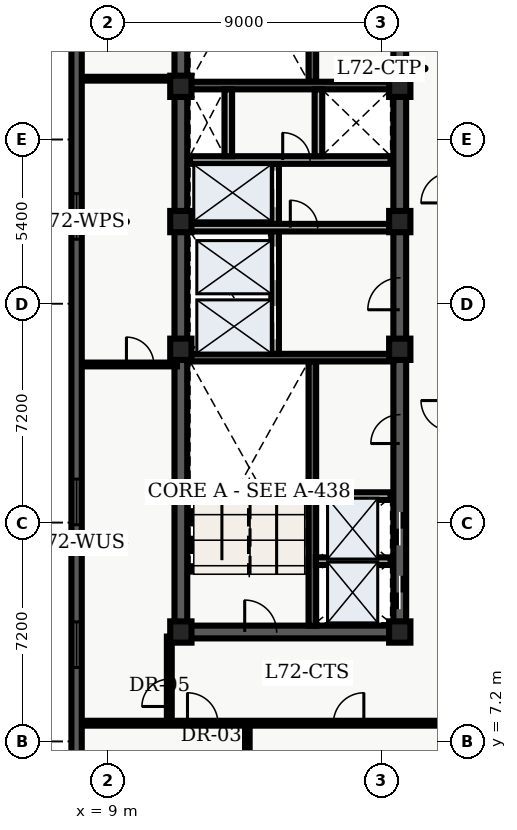
"""IFC4 building model, lengths in metres.
Left out: names, types, materials, properties, quantities, classifications, styles, units other than length and angle.
Written with IfcOpenShell. Run it as: python <this file> out.ifc"""

import sys

from ifc_helpers import new_model, entity, si_unit, converted_unit, direction, frame, origin_with_axes, origin_2d_with_axis, place, context, subcontext, project, spatial, polyline, rectangle, outline, extrude, element, fill, save


model = new_model("IFC4")
c1 = context("Model", 3, precision=1e-05, world=origin_with_axes(), true_north=direction((0.0, 1.0)))
c2 = subcontext(c1, "Body", "Model", "MODEL_VIEW")
j1 = project(units=[si_unit("LENGTHUNIT", "METRE"), converted_unit("PLANEANGLEUNIT", "DEGREE", entity("IfcPlaneAngleMeasure", 0.017), si_unit("PLANEANGLEUNIT", "RADIAN"), dimensions=[0, 0, 0, 0, 0, 0, 0])], contexts=[c1])
p1 = place(None, origin_with_axes())
s1 = spatial("IfcSite", under=j1, at=p1, CompositionType="ELEMENT")
p2 = place(p1, origin_with_axes())
s2 = spatial("IfcBuilding", under=s1, at=p2, CompositionType="ELEMENT")
p3 = place(p2, frame((0.0, 0.0, 291.9), z_axis=(0.0, 0.0, 1.0), x_axis=(1.0, 0.0, 0.0)))
s3 = spatial("IfcBuildingStorey", under=s2, at=p3, CompositionType="ELEMENT", Elevation=291.9)
p4 = place(p3, frame((11.4, 10.8, 0.0), z_axis=(0.0, 0.0, 1.0), x_axis=(0.0, 1.0, 0.0)))
e1 = element("IfcWall", 1, at=p4, inside=s3, PredefinedType="SHEAR", context=c2, shape_type="SweptSolid", body=[
    extrude(outline(polyline([(0.0, -0.21), (27.0, -0.21), (27.0, 0.21), (0.0, 0.21), (0.0, -0.21)])), origin_with_axes(), (0.0, 0.0, 1.0), 3.66),
])
p5 = place(p3, frame((11.4, 10.8, 0.0), z_axis=(0.0, 0.0, 1.0), x_axis=(1.0, 0.0, 0.0)))
e2 = element("IfcWall", 2, at=p5, inside=s3, PredefinedType="SHEAR", context=c2, shape_type="SweptSolid", body=[
    extrude(outline(polyline([(0.0, -0.21), (7.2, -0.21), (7.2, 0.21), (0.0, 0.21), (0.0, -0.21)])), origin_with_axes(), (0.0, 0.0, 1.0), 3.66),
])
p6 = place(p5, frame((2.625, 0.0, 0.0), z_axis=(0.0, 0.0, 1.0), x_axis=(1.0, 0.0, 0.0)))
e3 = element("IfcOpeningElement", 3, at=p6, cuts=e2, PredefinedType="OPENING", context=c2, shape_type="SweptSolid", body=[
    extrude(rectangle(XDim=1.05, YDim=0.44, at=origin_2d_with_axis()), origin_with_axes(), (0.0, 0.0, 1.0), 2.15),
])
p7 = place(p3, frame((18.6, 10.8, 0.0), z_axis=(0.0, 0.0, 1.0), x_axis=(0.0, 1.0, 0.0)))
e4 = element("IfcWall", 4, at=p7, inside=s3, PredefinedType="SHEAR", context=c2, shape_type="SweptSolid", body=[
    extrude(outline(polyline([(0.0, -0.21), (13.5, -0.21), (13.5, 0.21), (0.0, 0.21), (0.0, -0.21)])), origin_with_axes(), (0.0, 0.0, 1.0), 3.66),
])
p8 = place(p7, frame((1.3, 0.0, 0.0), z_axis=(0.0, 0.0, 1.0), x_axis=(1.0, 0.0, 0.0)))
e5 = element("IfcOpeningElement", 5, at=p8, cuts=e4, PredefinedType="OPENING", context=c2, shape_type="SweptSolid", body=[
    extrude(rectangle(XDim=1.1, YDim=0.44, at=origin_2d_with_axis()), origin_with_axes(), (0.0, 0.0, 1.0), 2.15),
])
p9 = place(p7, frame((3.4, 0.0, 0.0), z_axis=(0.0, 0.0, 1.0), x_axis=(1.0, 0.0, 0.0)))
e6 = element("IfcOpeningElement", 6, at=p9, cuts=e4, PredefinedType="OPENING", context=c2, shape_type="SweptSolid", body=[
    extrude(rectangle(XDim=1.1, YDim=0.44, at=origin_2d_with_axis()), origin_with_axes(), (0.0, 0.0, 1.0), 2.15),
])
p10 = place(p7, frame((11.125, 0.0, 0.0), z_axis=(0.0, 0.0, 1.0), x_axis=(1.0, 0.0, 0.0)))
e7 = element("IfcOpeningElement", 7, at=p10, cuts=e4, PredefinedType="OPENING", context=c2, shape_type="SweptSolid", body=[
    extrude(rectangle(XDim=1.05, YDim=0.44, at=origin_2d_with_axis()), origin_with_axes(), (0.0, 0.0, 1.0), 2.15),
])
p11 = place(p7, frame((6.675, 0.0, 0.0), z_axis=(0.0, 0.0, 1.0), x_axis=(1.0, 0.0, 0.0)))
e8 = element("IfcOpeningElement", 8, at=p11, cuts=e4, PredefinedType="OPENING", context=c2, shape_type="SweptSolid", body=[
    extrude(rectangle(XDim=0.95, YDim=0.44, at=origin_2d_with_axis()), origin_with_axes(), (0.0, 0.0, 1.0), 2.15),
])
p12 = place(p3, frame((18.6, 24.3, 0.0), z_axis=(0.0, 0.0, 1.0), x_axis=(0.0, 1.0, 0.0)))
e9 = element("IfcWall", 9, at=p12, inside=s3, PredefinedType="SHEAR", context=c2, shape_type="SweptSolid", body=[
    extrude(outline(polyline([(0.0, -0.21), (13.5, -0.21), (13.5, 0.21), (0.0, 0.21), (0.0, -0.21)])), origin_with_axes(), (0.0, 0.0, 1.0), 3.66),
])
p13 = place(p12, frame((8.525, 0.0, 0.0), z_axis=(0.0, 0.0, 1.0), x_axis=(1.0, 0.0, 0.0)))
e10 = element("IfcOpeningElement", 10, at=p13, cuts=e9, PredefinedType="OPENING", context=c2, shape_type="SweptSolid", body=[
    extrude(rectangle(XDim=1.05, YDim=0.44, at=origin_2d_with_axis()), origin_with_axes(), (0.0, 0.0, 1.0), 2.15),
])
p14 = place(p3, frame((15.725, 11.01, 0.0), z_axis=(0.0, 0.0, 1.0), x_axis=(0.0, 1.0, 0.0)))
e11 = element("IfcWall", 11, at=p14, inside=s3, PredefinedType="SHEAR", context=c2, shape_type="SweptSolid", body=[
    extrude(outline(polyline([(0.0, -0.125), (8.69, -0.125), (8.69, 0.125), (0.0, 0.125), (0.0, -0.125)])), origin_with_axes(), (0.0, 0.0, 1.0), 3.66),
])
p15 = place(p3, frame((11.61, 19.825, 0.0), z_axis=(0.0, 0.0, 1.0), x_axis=(1.0, 0.0, 0.0)))
e12 = element("IfcWall", 12, at=p15, inside=s3, PredefinedType="SHEAR", context=c2, shape_type="SweptSolid", body=[
    extrude(outline(polyline([(0.0, -0.125), (6.78, -0.125), (6.78, 0.125), (0.0, 0.125), (0.0, -0.125)])), origin_with_axes(), (0.0, 0.0, 1.0), 3.66),
])
p16 = place(p3, frame((15.725, 28.9, 0.0), z_axis=(0.0, 0.0, 1.0), x_axis=(0.0, 1.0, 0.0)))
e13 = element("IfcWall", 13, at=p16, inside=s3, PredefinedType="SHEAR", context=c2, shape_type="SweptSolid", body=[
    extrude(outline(polyline([(0.0, -0.125), (8.69, -0.125), (8.69, 0.125), (0.0, 0.125), (0.0, -0.125)])), origin_with_axes(), (0.0, 0.0, 1.0), 3.66),
])
p17 = place(p3, frame((11.61, 28.775, 0.0), z_axis=(0.0, 0.0, 1.0), x_axis=(1.0, 0.0, 0.0)))
e14 = element("IfcWall", 14, at=p17, inside=s3, PredefinedType="SHEAR", context=c2, shape_type="SweptSolid", body=[
    extrude(outline(polyline([(0.0, -0.125), (6.78, -0.125), (6.78, 0.125), (0.0, 0.125), (0.0, -0.125)])), origin_with_axes(), (0.0, 0.0, 1.0), 3.66),
])
p18 = place(p3, frame((14.5, 19.95, 0.0), z_axis=(0.0, 0.0, 1.0), x_axis=(0.0, 1.0, 0.0)))
e15 = element("IfcWall", 15, at=p18, inside=s3, PredefinedType="SOLIDWALL", context=c2, shape_type="SweptSolid", body=[
    extrude(outline(polyline([(0.0, -0.125), (6.25, -0.125), (6.25, 0.125), (0.0, 0.125), (0.0, -0.125)])), origin_with_axes(), (0.0, 0.0, 1.0), 2.7),
])
p19 = place(p18, frame((1.025, 0.0, 0.0), z_axis=(0.0, 0.0, 1.0), x_axis=(1.0, 0.0, 0.0)))
e16 = element("IfcOpeningElement", 16, at=p19, cuts=e15, PredefinedType="OPENING", context=c2, shape_type="SweptSolid", body=[
    extrude(rectangle(XDim=1.1, YDim=0.27, at=origin_2d_with_axis()), origin_with_axes(), (0.0, 0.0, 1.0), 2.15),
])
p20 = place(p18, frame((2.975, 0.0, 0.0), z_axis=(0.0, 0.0, 1.0), x_axis=(1.0, 0.0, 0.0)))
e17 = element("IfcOpeningElement", 17, at=p20, cuts=e15, PredefinedType="OPENING", context=c2, shape_type="SweptSolid", body=[
    extrude(rectangle(XDim=1.1, YDim=0.27, at=origin_2d_with_axis()), origin_with_axes(), (0.0, 0.0, 1.0), 2.15),
])
p21 = place(p18, frame((5.425, 0.0, 0.0), z_axis=(0.0, 0.0, 1.0), x_axis=(1.0, 0.0, 0.0)))
e18 = element("IfcOpeningElement", 18, at=p21, cuts=e15, PredefinedType="OPENING", context=c2, shape_type="SweptSolid", body=[
    extrude(rectangle(XDim=1.2, YDim=0.27, at=origin_2d_with_axis()), origin_with_axes(), (0.0, 0.0, 1.0), 2.15),
])
p22 = place(p3, frame((11.7, 24.1, 0.0), z_axis=(0.0, 0.0, 1.0), x_axis=(1.0, 0.0, 0.0)))
e19 = element("IfcWall", 19, at=p22, inside=s3, PredefinedType="SOLIDWALL", context=c2, shape_type="SweptSolid", body=[
    extrude(outline(polyline([(0.0, -0.125), (6.6, -0.125), (6.6, 0.125), (0.0, 0.125), (0.0, -0.125)])), origin_with_axes(), (0.0, 0.0, 1.0), 2.7),
])
p23 = place(p22, frame((3.75, 0.0, 0.0), z_axis=(0.0, 0.0, 1.0), x_axis=(1.0, 0.0, 0.0)))
e20 = element("IfcOpeningElement", 20, at=p23, cuts=e19, PredefinedType="OPENING", context=c2, shape_type="SweptSolid", body=[
    extrude(rectangle(XDim=0.9, YDim=0.27, at=origin_2d_with_axis()), origin_with_axes(), (0.0, 0.0, 1.0), 2.15),
])
p24 = place(p3, frame((11.7, 26.325, 0.0), z_axis=(0.0, 0.0, 1.0), x_axis=(1.0, 0.0, 0.0)))
e21 = element("IfcWall", 21, at=p24, inside=s3, PredefinedType="SOLIDWALL", context=c2, shape_type="SweptSolid", body=[
    extrude(outline(polyline([(0.0, -0.125), (6.6, -0.125), (6.6, 0.125), (0.0, 0.125), (0.0, -0.125)])), origin_with_axes(), (0.0, 0.0, 1.0), 2.7),
])
p25 = place(p24, frame((3.5, 0.0, 0.0), z_axis=(0.0, 0.0, 1.0), x_axis=(1.0, 0.0, 0.0)))
e22 = element("IfcOpeningElement", 22, at=p25, cuts=e21, PredefinedType="OPENING", context=c2, shape_type="SweptSolid", body=[
    extrude(rectangle(XDim=0.9, YDim=0.27, at=origin_2d_with_axis()), origin_with_axes(), (0.0, 0.0, 1.0), 2.15),
])
for number, where, z_axis, x_axis in (
    (23, (12.96, 26.45, 0.0), (0.0, 0.0, 1.0), (0.0, 1.0, 0.0)),
    (24, (15.925, 26.45, 0.0), (0.0, 0.0, 1.0), (0.0, 1.0, 0.0)),
):
    element("IfcWall", number, at=place(p3, frame(where, z_axis=z_axis, x_axis=x_axis)), inside=s3, PredefinedType="SOLIDWALL", context=c2, shape_type="SweptSolid", body=[
        extrude(outline(polyline([(0.0, -0.125), (2.2, -0.125), (2.2, 0.125), (0.0, 0.125), (0.0, -0.125)])), origin_with_axes(), (0.0, 0.0, 1.0), 2.7),
    ])
for number, where, z_axis, x_axis in (
    (25, (11.4, 10.8, 0.0), (0.0, 0.0, 1.0), (1.0, 0.0, 0.0)),
    (26, (11.4, 20.1, 0.0), (0.0, 0.0, 1.0), (1.0, 0.0, 0.0)),
    (27, (11.4, 24.3, 0.0), (0.0, 0.0, 1.0), (1.0, 0.0, 0.0)),
    (28, (11.4, 28.75, 0.0), (0.0, 0.0, 1.0), (1.0, 0.0, 0.0)),
    (29, (18.6, 10.8, 0.0), (0.0, 0.0, 1.0), (1.0, 0.0, 0.0)),
    (30, (18.6, 20.1, 0.0), (0.0, 0.0, 1.0), (1.0, 0.0, 0.0)),
    (31, (18.6, 24.3, 0.0), (0.0, 0.0, 1.0), (1.0, 0.0, 0.0)),
    (32, (18.6, 28.75, 0.0), (0.0, 0.0, 1.0), (1.0, 0.0, 0.0)),
):
    element("IfcColumn", number, at=place(p3, frame(where, z_axis=z_axis, x_axis=x_axis)), inside=s3, PredefinedType="COLUMN", context=c2, shape_type="SweptSolid", body=[
        extrude(rectangle(XDim=0.7, YDim=0.7, at=origin_2d_with_axis()), origin_with_axes(), (0.0, 0.0, 1.0), 3.9),
    ])
for number, where, z_axis, x_axis in (
    (33, (15.84, 13.13, 0.0), (0.0, 0.0, 1.0), (1.0, 0.0, 0.0)),
    (34, (15.84, 15.27, 0.0), (0.0, 0.0, 1.0), (1.0, 0.0, 0.0)),
):
    element("IfcWall", number, at=place(p3, frame(where, z_axis=z_axis, x_axis=x_axis)), inside=s3, PredefinedType="SOLIDWALL", context=c2, shape_type="SweptSolid", body=[
        extrude(outline(polyline([(0.0, -0.125), (2.46, -0.125), (2.46, 0.125), (0.0, 0.125), (0.0, -0.125)])), origin_with_axes(), (0.0, 0.0, 1.0), 2.7),
    ])
p26 = place(p3, frame((8.135, 7.8, 0.0), z_axis=(0.0, 0.0, 1.0), x_axis=(1.0, 0.0, 0.0)))
e35 = element("IfcWall", 35, at=p26, inside=s3, PredefinedType="PARTITIONING", context=c2, shape_type="SweptSolid", body=[
    extrude(outline(polyline([(0.0, -0.08), (12.165, -0.08), (12.165, 0.08), (0.0, 0.08), (0.0, -0.08)])), origin_with_axes(), (0.0, 0.0, 1.0), 2.7),
])
p27 = place(p26, frame((3.983, 0.0, 0.0), z_axis=(0.0, 0.0, 1.0), x_axis=(1.0, 0.0, 0.0)))
e36 = element("IfcOpeningElement", 36, at=p27, cuts=e35, PredefinedType="OPENING", context=c2, shape_type="SweptSolid", body=[
    extrude(rectangle(XDim=1.0, YDim=0.18, at=origin_2d_with_axis()), origin_with_axes(), (0.0, 0.0, 1.0), 2.15),
])
p28 = place(p26, frame((8.784, 0.0, 0.0), z_axis=(0.0, 0.0, 1.0), x_axis=(1.0, 0.0, 0.0)))
e37 = element("IfcOpeningElement", 37, at=p28, cuts=e35, PredefinedType="OPENING", context=c2, shape_type="SweptSolid", body=[
    extrude(rectangle(XDim=1.0, YDim=0.18, at=origin_2d_with_axis()), origin_with_axes(), (0.0, 0.0, 1.0), 2.15),
])
p29 = place(p3, frame((11.02, 7.8, 0.0), z_axis=(0.0, 0.0, 1.0), x_axis=(0.0, 1.0, 0.0)))
e38 = element("IfcWall", 38, at=p29, inside=s3, PredefinedType="PARTITIONING", context=c2, shape_type="SweptSolid", body=[
    extrude(outline(polyline([(0.0, -0.08), (2.85, -0.08), (2.85, 0.08), (0.0, 0.08), (0.0, -0.08)])), origin_with_axes(), (0.0, 0.0, 1.0), 2.7),
])
p30 = place(p29, frame((1.0, 0.0, 0.0), z_axis=(0.0, 0.0, 1.0), x_axis=(1.0, 0.0, 0.0)))
e39 = element("IfcOpeningElement", 39, at=p30, cuts=e38, PredefinedType="OPENING", context=c2, shape_type="SweptSolid", body=[
    extrude(rectangle(XDim=0.9, YDim=0.18, at=origin_2d_with_axis()), origin_with_axes(), (0.0, 0.0, 1.0), 2.15),
])
p31 = place(p3, frame((8.135, 19.6, 0.0), z_axis=(0.0, 0.0, 1.0), x_axis=(1.0, 0.0, 0.0)))
e40 = element("IfcWall", 40, at=p31, inside=s3, PredefinedType="PARTITIONING", context=c2, shape_type="SweptSolid", body=[
    extrude(outline(polyline([(0.0, -0.062), (3.135, -0.062), (3.135, 0.062), (0.0, 0.062), (0.0, -0.062)])), origin_with_axes(), (0.0, 0.0, 1.0), 2.7),
])
p32 = place(p31, frame((1.925, 0.0, 0.0), z_axis=(0.0, 0.0, 1.0), x_axis=(1.0, 0.0, 0.0)))
e41 = element("IfcOpeningElement", 41, at=p32, cuts=e40, PredefinedType="OPENING", context=c2, shape_type="SweptSolid", body=[
    extrude(rectangle(XDim=0.9, YDim=0.145, at=origin_2d_with_axis()), origin_with_axes(), (0.0, 0.0, 1.0), 2.15),
])
p33 = place(p3, frame((8.135, 29.0, 0.0), z_axis=(0.0, 0.0, 1.0), x_axis=(1.0, 0.0, 0.0)))
e42 = element("IfcWall", 42, at=p33, inside=s3, PredefinedType="PARTITIONING", context=c2, shape_type="SweptSolid", body=[
    extrude(outline(polyline([(0.0, -0.062), (3.135, -0.062), (3.135, 0.062), (0.0, 0.062), (0.0, -0.062)])), origin_with_axes(), (0.0, 0.0, 1.0), 2.7),
])
p34 = place(p3, frame((13.587, 2.58, 0.0), z_axis=(0.0, 0.0, 1.0), x_axis=(0.0, 1.0, 0.0)))
e43 = element("IfcWall", 43, at=p34, inside=s3, PredefinedType="PARTITIONING", context=c2, shape_type="SweptSolid", body=[
    extrude(outline(polyline([(0.0, -0.075), (5.12, -0.075), (5.12, 0.075), (0.0, 0.075), (0.0, -0.075)])), origin_with_axes(), (0.0, 0.0, 1.0), 2.7),
])
p35 = place(p3, frame((7.97, 2.74, 0.0), z_axis=(0.0, 0.0, 1.0), x_axis=(0.0, 1.0, 0.0)))
e44 = element("IfcWall", 44, at=p35, inside=s3, PredefinedType="SOLIDWALL", context=c2, shape_type="SweptSolid", body=[
    extrude(outline(polyline([(0.0, -0.17), (43.46, -0.17), (43.46, 0.17), (0.0, 0.17), (0.0, -0.17)])), origin_with_axes(), (0.0, 0.0, 1.0), 3.66),
])
p36 = place(p35, frame((2.948, 0.0, 0.45), z_axis=(0.0, 0.0, 1.0), x_axis=(1.0, 0.0, 0.0)))
e45 = element("IfcOpeningElement", 45, at=p36, cuts=e44, PredefinedType="OPENING", context=c2, shape_type="SweptSolid", body=[
    extrude(rectangle(XDim=1.5, YDim=0.36, at=origin_2d_with_axis()), origin_with_axes(), (0.0, 0.0, 1.0), 2.1),
])
p37 = place(p35, frame((7.643, 0.0, 0.45), z_axis=(0.0, 0.0, 1.0), x_axis=(1.0, 0.0, 0.0)))
e46 = element("IfcOpeningElement", 46, at=p37, cuts=e44, PredefinedType="OPENING", context=c2, shape_type="SweptSolid", body=[
    extrude(rectangle(XDim=1.5, YDim=0.36, at=origin_2d_with_axis()), origin_with_axes(), (0.0, 0.0, 1.0), 2.1),
])
p38 = place(p35, frame((12.339, 0.0, 0.45), z_axis=(0.0, 0.0, 1.0), x_axis=(1.0, 0.0, 0.0)))
e47 = element("IfcOpeningElement", 47, at=p38, cuts=e44, PredefinedType="OPENING", context=c2, shape_type="SweptSolid", body=[
    extrude(rectangle(XDim=1.5, YDim=0.36, at=origin_2d_with_axis()), origin_with_axes(), (0.0, 0.0, 1.0), 2.1),
])
p39 = place(p35, frame((21.73, 0.0, 0.45), z_axis=(0.0, 0.0, 1.0), x_axis=(1.0, 0.0, 0.0)))
e48 = element("IfcOpeningElement", 48, at=p39, cuts=e44, PredefinedType="OPENING", context=c2, shape_type="SweptSolid", body=[
    extrude(rectangle(XDim=1.5, YDim=0.36, at=origin_2d_with_axis()), origin_with_axes(), (0.0, 0.0, 1.0), 2.1),
])
p40 = place(p35, frame((31.121, 0.0, 0.45), z_axis=(0.0, 0.0, 1.0), x_axis=(1.0, 0.0, 0.0)))
e49 = element("IfcOpeningElement", 49, at=p40, cuts=e44, PredefinedType="OPENING", context=c2, shape_type="SweptSolid", body=[
    extrude(rectangle(XDim=1.5, YDim=0.36, at=origin_2d_with_axis()), origin_with_axes(), (0.0, 0.0, 1.0), 2.1),
])
p41 = place(p35, frame((35.817, 0.0, 0.45), z_axis=(0.0, 0.0, 1.0), x_axis=(1.0, 0.0, 0.0)))
e50 = element("IfcOpeningElement", 50, at=p41, cuts=e44, PredefinedType="OPENING", context=c2, shape_type="SweptSolid", body=[
    extrude(rectangle(XDim=1.5, YDim=0.36, at=origin_2d_with_axis()), origin_with_axes(), (0.0, 0.0, 1.0), 2.1),
])
p42 = place(p35, frame((40.512, 0.0, 0.45), z_axis=(0.0, 0.0, 1.0), x_axis=(1.0, 0.0, 0.0)))
e51 = element("IfcOpeningElement", 51, at=p42, cuts=e44, PredefinedType="OPENING", context=c2, shape_type="SweptSolid", body=[
    extrude(rectangle(XDim=1.5, YDim=0.36, at=origin_2d_with_axis()), origin_with_axes(), (0.0, 0.0, 1.0), 2.1),
])
p43 = place(p7, frame((1.3, 0.0, 0.0), z_axis=(0.0, 0.0, 1.0), x_axis=(1.0, 0.0, 0.0)))
e52 = element("IfcDoor", 52, at=p43, inside=s3, OperationType="SLIDING_TO_LEFT", PredefinedType="DOOR", context=c2, shape_type="SweptSolid", body=[
    extrude(rectangle(XDim=1.1, YDim=0.09, at=origin_2d_with_axis()), origin_with_axes(), (0.0, 0.0, 1.0), 2.15),
])
fill(e5, e52)
p44 = place(p7, frame((3.4, 0.0, 0.0), z_axis=(0.0, 0.0, 1.0), x_axis=(1.0, 0.0, 0.0)))
e53 = element("IfcDoor", 53, at=p44, inside=s3, OperationType="SLIDING_TO_RIGHT", PredefinedType="DOOR", context=c2, shape_type="SweptSolid", body=[
    extrude(rectangle(XDim=1.1, YDim=0.09, at=origin_2d_with_axis()), origin_with_axes(), (0.0, 0.0, 1.0), 2.15),
])
fill(e6, e53)
p45 = place(p18, frame((1.025, 0.0, 0.0), z_axis=(0.0, 0.0, 1.0), x_axis=(1.0, 0.0, 0.0)))
e54 = element("IfcDoor", 54, at=p45, inside=s3, OperationType="SLIDING_TO_LEFT", PredefinedType="DOOR", context=c2, shape_type="SweptSolid", body=[
    extrude(rectangle(XDim=1.1, YDim=0.09, at=origin_2d_with_axis()), origin_with_axes(), (0.0, 0.0, 1.0), 2.15),
])
fill(e16, e54)
p46 = place(p18, frame((2.975, 0.0, 0.0), z_axis=(0.0, 0.0, 1.0), x_axis=(1.0, 0.0, 0.0)))
e55 = element("IfcDoor", 55, at=p46, inside=s3, OperationType="SLIDING_TO_RIGHT", PredefinedType="DOOR", context=c2, shape_type="SweptSolid", body=[
    extrude(rectangle(XDim=1.1, YDim=0.09, at=origin_2d_with_axis()), origin_with_axes(), (0.0, 0.0, 1.0), 2.15),
])
fill(e17, e55)
p47 = place(p18, frame((5.425, 0.0, 0.0), z_axis=(0.0, 0.0, 1.0), x_axis=(1.0, 0.0, 0.0)))
e56 = element("IfcDoor", 56, at=p47, inside=s3, OperationType="DOUBLE_DOOR_SLIDING", PredefinedType="DOOR", context=c2, shape_type="SweptSolid", body=[
    extrude(rectangle(XDim=1.2, YDim=0.09, at=origin_2d_with_axis()), origin_with_axes(), (0.0, 0.0, 1.0), 2.15),
])
fill(e18, e56)
p48 = place(p5, frame((2.625, 0.0, 0.0), z_axis=(0.0, 0.0, 1.0), x_axis=(1.0, 0.0, 0.0)))
e57 = element("IfcDoor", 57, at=p48, inside=s3, OperationType="SINGLE_SWING_LEFT", PredefinedType="DOOR", context=c2, shape_type="SweptSolid", body=[
    extrude(rectangle(XDim=1.05, YDim=0.09, at=origin_2d_with_axis()), origin_with_axes(), (0.0, 0.0, 1.0), 2.15),
])
fill(e3, e57)
p49 = place(p7, frame((11.125, 0.0, 0.0), z_axis=(0.0, 0.0, 1.0), x_axis=(1.0, 0.0, 0.0)))
e58 = element("IfcDoor", 58, at=p49, inside=s3, OperationType="SINGLE_SWING_LEFT", PredefinedType="DOOR", context=c2, shape_type="SweptSolid", body=[
    extrude(rectangle(XDim=1.05, YDim=0.09, at=origin_2d_with_axis()), origin_with_axes(), (0.0, 0.0, 1.0), 2.15),
])
fill(e7, e58)
p50 = place(p22, frame((3.75, 0.0, 0.0), z_axis=(0.0, 0.0, 1.0), x_axis=(1.0, 0.0, 0.0)))
e59 = element("IfcDoor", 59, at=p50, inside=s3, OperationType="SINGLE_SWING_LEFT", PredefinedType="DOOR", context=c2, shape_type="SweptSolid", body=[
    extrude(rectangle(XDim=0.9, YDim=0.09, at=origin_2d_with_axis()), origin_with_axes(), (0.0, 0.0, 1.0), 2.15),
])
fill(e20, e59)
p51 = place(p24, frame((3.5, 0.0, 0.0), z_axis=(0.0, 0.0, 1.0), x_axis=(1.0, 0.0, 0.0)))
e60 = element("IfcDoor", 60, at=p51, inside=s3, OperationType="SINGLE_SWING_LEFT", PredefinedType="DOOR", context=c2, shape_type="SweptSolid", body=[
    extrude(rectangle(XDim=0.9, YDim=0.09, at=origin_2d_with_axis()), origin_with_axes(), (0.0, 0.0, 1.0), 2.15),
])
fill(e22, e60)
p52 = place(p7, frame((6.675, 0.0, 0.0), z_axis=(0.0, 0.0, 1.0), x_axis=(1.0, 0.0, 0.0)))
e61 = element("IfcDoor", 61, at=p52, inside=s3, OperationType="SINGLE_SWING_LEFT", PredefinedType="DOOR", context=c2, shape_type="SweptSolid", body=[
    extrude(rectangle(XDim=0.95, YDim=0.09, at=origin_2d_with_axis()), origin_with_axes(), (0.0, 0.0, 1.0), 2.15),
])
fill(e8, e61)
p53 = place(p29, frame((1.0, 0.0, 0.0), z_axis=(0.0, 0.0, 1.0), x_axis=(1.0, 0.0, 0.0)))
e62 = element("IfcDoor", 62, at=p53, inside=s3, OperationType="SINGLE_SWING_LEFT", PredefinedType="DOOR", context=c2, shape_type="SweptSolid", body=[
    extrude(rectangle(XDim=0.9, YDim=0.09, at=origin_2d_with_axis()), origin_with_axes(), (0.0, 0.0, 1.0), 2.15),
])
fill(e39, e62)
p54 = place(p31, frame((1.925, 0.0, 0.0), z_axis=(0.0, 0.0, 1.0), x_axis=(1.0, 0.0, 0.0)))
e63 = element("IfcDoor", 63, at=p54, inside=s3, OperationType="SINGLE_SWING_LEFT", PredefinedType="DOOR", context=c2, shape_type="SweptSolid", body=[
    extrude(rectangle(XDim=0.9, YDim=0.075, at=origin_2d_with_axis()), origin_with_axes(), (0.0, 0.0, 1.0), 2.15),
])
fill(e41, e63)
p55 = place(p26, frame((3.983, 0.0, 0.0), z_axis=(0.0, 0.0, 1.0), x_axis=(1.0, 0.0, 0.0)))
e64 = element("IfcDoor", 64, at=p55, inside=s3, OperationType="SINGLE_SWING_LEFT", PredefinedType="DOOR", context=c2, shape_type="SweptSolid", body=[
    extrude(rectangle(XDim=1.0, YDim=0.09, at=origin_2d_with_axis()), origin_with_axes(), (0.0, 0.0, 1.0), 2.15),
])
fill(e36, e64)
p56 = place(p26, frame((8.784, 0.0, 0.0), z_axis=(0.0, 0.0, 1.0), x_axis=(1.0, 0.0, 0.0)))
e65 = element("IfcDoor", 65, at=p56, inside=s3, OperationType="SINGLE_SWING_RIGHT", PredefinedType="DOOR", context=c2, shape_type="SweptSolid", body=[
    extrude(rectangle(XDim=1.0, YDim=0.09, at=origin_2d_with_axis()), origin_with_axes(), (0.0, 0.0, 1.0), 2.15),
])
fill(e37, e65)
p57 = place(p35, frame((7.643, 0.0, 0.45), z_axis=(0.0, 0.0, 1.0), x_axis=(1.0, 0.0, 0.0)))
e66 = element("IfcWindow", 66, at=p57, inside=s3, PredefinedType="WINDOW", context=c2, shape_type="SweptSolid", body=[
    extrude(rectangle(XDim=1.5, YDim=0.09, at=origin_2d_with_axis()), origin_with_axes(), (0.0, 0.0, 1.0), 2.1),
])
fill(e46, e66)
p58 = place(p35, frame((12.339, 0.0, 0.45), z_axis=(0.0, 0.0, 1.0), x_axis=(1.0, 0.0, 0.0)))
e67 = element("IfcWindow", 67, at=p58, inside=s3, PredefinedType="WINDOW", context=c2, shape_type="SweptSolid", body=[
    extrude(rectangle(XDim=1.5, YDim=0.09, at=origin_2d_with_axis()), origin_with_axes(), (0.0, 0.0, 1.0), 2.1),
])
fill(e47, e67)
p59 = place(p35, frame((21.73, 0.0, 0.45), z_axis=(0.0, 0.0, 1.0), x_axis=(1.0, 0.0, 0.0)))
e68 = element("IfcWindow", 68, at=p59, inside=s3, PredefinedType="WINDOW", context=c2, shape_type="SweptSolid", body=[
    extrude(rectangle(XDim=1.5, YDim=0.09, at=origin_2d_with_axis()), origin_with_axes(), (0.0, 0.0, 1.0), 2.1),
])
fill(e48, e68)
save(model, sys.argv[1])
